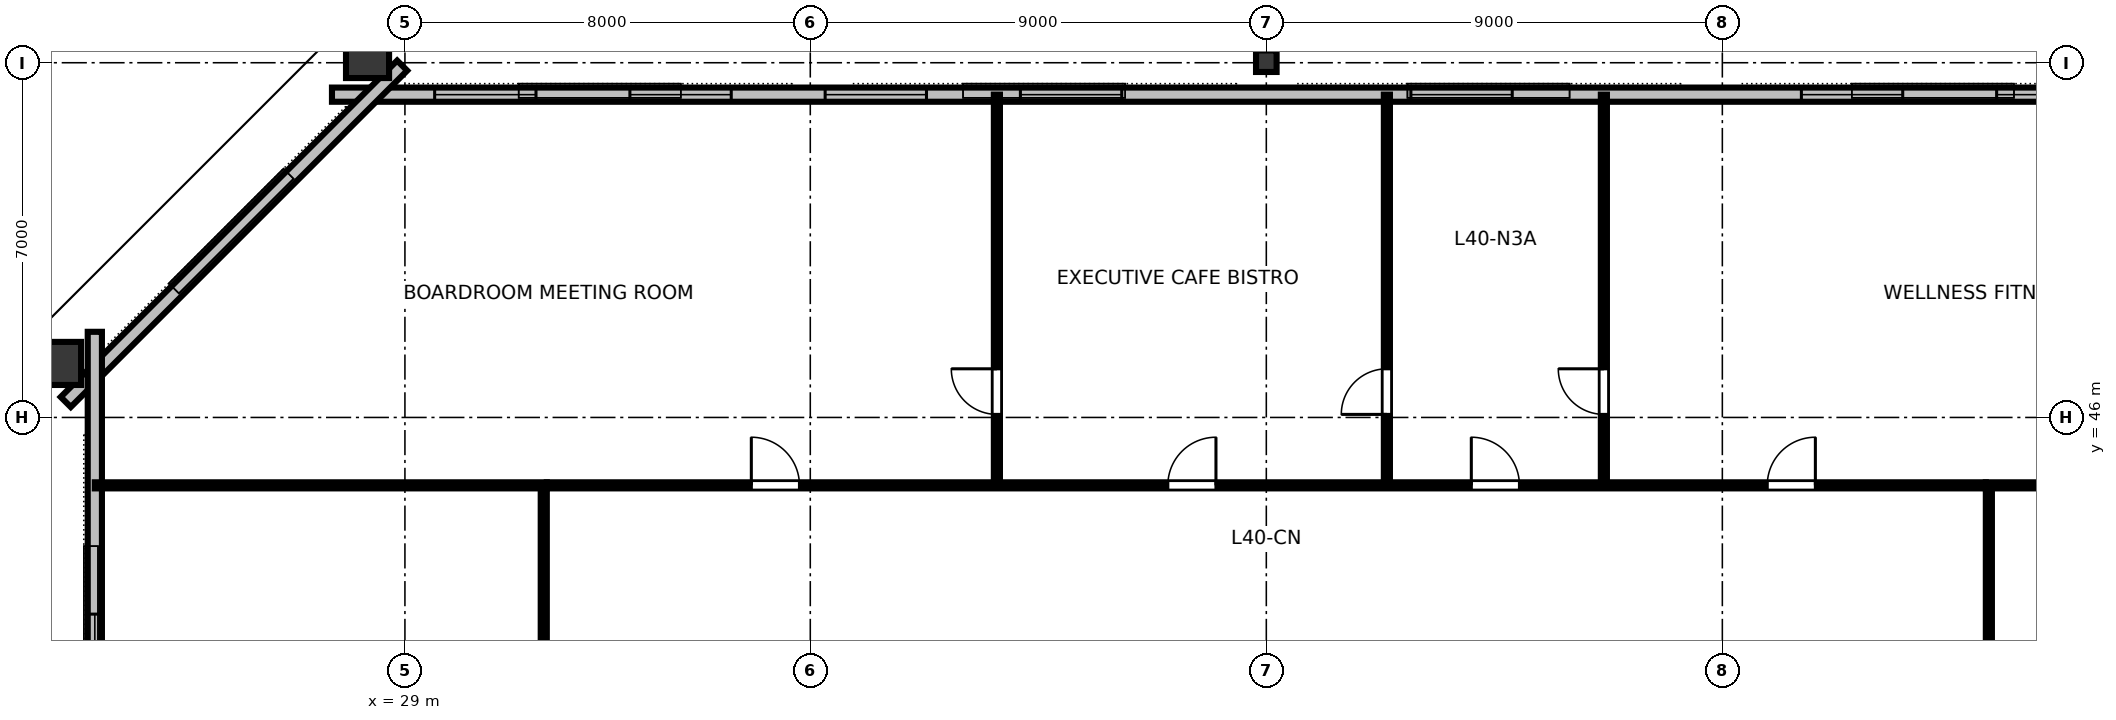
"""IFC4 building model, lengths in metres.
Left out: names, types, materials, properties, quantities, classifications, styles, units other than length and angle.
Written with IfcOpenShell. Run it as: python <this file> out.ifc"""

import sys

from ifc_helpers import new_model, si_unit, direction, frame, frame_2d, origin, origin_2d, place, context, subcontext, project, spatial, rectangle, hollow_rectangle, i_section, extrude, element, fill, save


model = new_model("IFC4")
c1 = context("Model", 3, precision=1e-05, world=origin(), true_north=direction((0.0, 1.0)))
c2 = subcontext(c1, "Body", "Model", "MODEL_VIEW")
j1 = project(units=[si_unit("LENGTHUNIT", "METRE"), si_unit("PLANEANGLEUNIT", "RADIAN")], contexts=[c1])
p1 = place(None, origin())
s1 = spatial("IfcSite", under=j1, at=p1, CompositionType="ELEMENT")
p2 = place(p1, origin())
s2 = spatial("IfcBuilding", under=s1, at=p2, CompositionType="ELEMENT")
p3 = place(p2, frame((0.0, 0.0, 152.8)))
s3 = spatial("IfcBuildingStorey", under=s2, at=p3, CompositionType="ELEMENT", Elevation=152.8)
p4 = place(p3, frame((46.0, 53.03, 0.0), z_axis=(0.0, 0.0, 1.0), x_axis=(1.0, 0.0, 0.0)))
e1 = element("IfcColumn", 1, at=p4, inside=s3, PredefinedType="COLUMN", context=c2, shape_type="SweptSolid", body=[
    extrude(i_section(OverallWidth=0.406, OverallDepth=0.425, WebThickness=0.033, FlangeThickness=0.052, FilletRadius=0.025, at=origin_2d()), origin(), (0.0, 0.0, 1.0), 3.358),
])
for number, where, z_axis, x_axis in (
    (2, (28.262, 53.198, 0.0), (0.0, 0.0, 1.0), (1.0, 0.0, 0.0)),
    (3, (22.109, 47.066, 0.0), (0.0, 0.0, 1.0), (0.0, 1.0, 0.0)),
):
    element("IfcColumn", number, at=place(p3, frame(where, z_axis=z_axis, x_axis=x_axis)), inside=s3, PredefinedType="COLUMN", context=c2, shape_type="SweptSolid", body=[
        extrude(hollow_rectangle(XDim=0.85, YDim=1.0, WallThickness=0.05, at=origin_2d()), origin(), (0.0, 0.0, 1.0), 3.358),
    ])
p5 = place(p3, frame((64.44, 52.37, 0.0), z_axis=(0.0, 0.0, 1.0), x_axis=(-1.0, 0.0, 0.0)))
e4 = element("IfcWall", 4, at=p5, inside=s3, PredefinedType="STANDARD", context=c2, shape_type="SweptSolid", body=[
    extrude(rectangle(XDim=36.88, YDim=0.28, at=frame_2d((18.44, 0.0))), origin(), (0.0, 0.0, 1.0), 3.36),
])
p6 = place(p5, frame((2.027, 0.0, 0.8)))
e5 = element("IfcOpeningElement", 5, at=p6, cuts=e4, PredefinedType="OPENING", context=c2, shape_type="SweptSolid", body=[
    extrude(rectangle(XDim=2.0, YDim=1.95, at=frame_2d((1.0, 0.975))), frame((0.0, 0.15, 0.0), z_axis=(0.0, -1.0, 0.0), x_axis=(1.0, 0.0, 0.0)), (0.0, 0.0, 1.0), 0.3),
])
p7 = place(p5, frame((5.88, 0.0, 0.8)))
e6 = element("IfcOpeningElement", 6, at=p7, cuts=e4, PredefinedType="OPENING", context=c2, shape_type="SweptSolid", body=[
    extrude(rectangle(XDim=2.0, YDim=1.95, at=frame_2d((1.0, 0.975))), frame((0.0, 0.15, 0.0), z_axis=(0.0, -1.0, 0.0), x_axis=(1.0, 0.0, 0.0)), (0.0, 0.0, 1.0), 0.3),
])
p8 = place(p5, frame((13.587, 0.0, 0.8)))
e7 = element("IfcOpeningElement", 7, at=p8, cuts=e4, PredefinedType="OPENING", context=c2, shape_type="SweptSolid", body=[
    extrude(rectangle(XDim=2.0, YDim=1.95, at=frame_2d((1.0, 0.975))), frame((0.0, 0.15, 0.0), z_axis=(0.0, -1.0, 0.0), x_axis=(1.0, 0.0, 0.0)), (0.0, 0.0, 1.0), 0.3),
])
p9 = place(p5, frame((21.293, 0.0, 0.8)))
e8 = element("IfcOpeningElement", 8, at=p9, cuts=e4, PredefinedType="OPENING", context=c2, shape_type="SweptSolid", body=[
    extrude(rectangle(XDim=2.0, YDim=1.95, at=frame_2d((1.0, 0.975))), frame((0.0, 0.15, 0.0), z_axis=(0.0, -1.0, 0.0), x_axis=(1.0, 0.0, 0.0)), (0.0, 0.0, 1.0), 0.3),
])
p10 = place(p5, frame((25.147, 0.0, 0.8)))
e9 = element("IfcOpeningElement", 9, at=p10, cuts=e4, PredefinedType="OPENING", context=c2, shape_type="SweptSolid", body=[
    extrude(rectangle(XDim=2.0, YDim=1.95, at=frame_2d((1.0, 0.975))), frame((0.0, 0.15, 0.0), z_axis=(0.0, -1.0, 0.0), x_axis=(1.0, 0.0, 0.0)), (0.0, 0.0, 1.0), 0.3),
])
p11 = place(p5, frame((29.0, 0.0, 0.8)))
e10 = element("IfcOpeningElement", 10, at=p11, cuts=e4, PredefinedType="OPENING", context=c2, shape_type="SweptSolid", body=[
    extrude(rectangle(XDim=2.0, YDim=1.95, at=frame_2d((1.0, 0.975))), frame((0.0, 0.15, 0.0), z_axis=(0.0, -1.0, 0.0), x_axis=(1.0, 0.0, 0.0)), (0.0, 0.0, 1.0), 0.3),
])
p12 = place(p5, frame((32.853, 0.0, 0.8)))
e11 = element("IfcOpeningElement", 11, at=p12, cuts=e4, PredefinedType="OPENING", context=c2, shape_type="SweptSolid", body=[
    extrude(rectangle(XDim=2.0, YDim=1.95, at=frame_2d((1.0, 0.975))), frame((0.0, 0.15, 0.0), z_axis=(0.0, -1.0, 0.0), x_axis=(1.0, 0.0, 0.0)), (0.0, 0.0, 1.0), 0.3),
])
p13 = place(p3, frame((28.946, 52.944, 0.0), z_axis=(0.0, 0.0, 1.0), x_axis=(-0.707106781187, -0.707106781187, 0.0)))
e12 = element("IfcWall", 12, at=p13, inside=s3, PredefinedType="STANDARD", context=c2, shape_type="SweptSolid", body=[
    extrude(rectangle(XDim=9.39, YDim=0.28, at=frame_2d((4.695, 0.0))), origin(), (0.0, 0.0, 1.0), 3.36),
])
p14 = place(p3, frame((22.88, 47.69, 0.0), z_axis=(0.0, 0.0, 1.0), x_axis=(0.0, -1.0, 0.0)))
e13 = element("IfcWall", 13, at=p14, inside=s3, PredefinedType="STANDARD", context=c2, shape_type="SweptSolid", body=[
    extrude(rectangle(XDim=31.38, YDim=0.28, at=frame_2d((15.69, 0.0))), origin(), (0.0, 0.0, 1.0), 3.36),
])
p15 = place(p14, frame((5.571, 0.0, 0.8)))
e14 = element("IfcOpeningElement", 14, at=p15, cuts=e13, PredefinedType="OPENING", context=c2, shape_type="SweptSolid", body=[
    extrude(rectangle(XDim=2.0, YDim=1.95, at=frame_2d((1.0, 0.975))), frame((0.0, 0.15, 0.0), z_axis=(0.0, -1.0, 0.0), x_axis=(1.0, 0.0, 0.0)), (0.0, 0.0, 1.0), 0.3),
])
p16 = place(p14, frame((20.161, 0.0, 0.8)))
e15 = element("IfcOpeningElement", 15, at=p16, cuts=e13, PredefinedType="OPENING", context=c2, shape_type="SweptSolid", body=[
    extrude(rectangle(XDim=2.0, YDim=1.95, at=frame_2d((1.0, 0.975))), frame((0.0, 0.15, 0.0), z_axis=(0.0, -1.0, 0.0), x_axis=(1.0, 0.0, 0.0)), (0.0, 0.0, 1.0), 0.3),
])
p17 = place(p14, frame((23.809, 0.0, 0.8)))
e16 = element("IfcOpeningElement", 16, at=p17, cuts=e13, PredefinedType="OPENING", context=c2, shape_type="SweptSolid", body=[
    extrude(rectangle(XDim=2.0, YDim=1.95, at=frame_2d((1.0, 0.975))), frame((0.0, 0.15, 0.0), z_axis=(0.0, -1.0, 0.0), x_axis=(1.0, 0.0, 0.0)), (0.0, 0.0, 1.0), 0.3),
])
p18 = place(p3, frame((40.683, 44.66, 0.0), z_axis=(0.0, 0.0, 1.0), x_axis=(0.0, 1.0, 0.0)))
e17 = element("IfcWall", 17, at=p18, inside=s3, PredefinedType="PARTITIONING", context=c2, shape_type="SweptSolid", body=[
    extrude(rectangle(XDim=7.71, YDim=0.12, at=frame_2d((3.855, 0.0))), origin(), (0.0, 0.0, 1.0), 2.64),
])
p19 = place(p18, frame((1.4, 0.0, 0.0)))
e18 = element("IfcOpeningElement", 18, at=p19, cuts=e17, PredefinedType="OPENING", context=c2, shape_type="SweptSolid", body=[
    extrude(rectangle(XDim=0.9, YDim=2.15, at=frame_2d((0.45, 1.075))), frame((0.0, 0.07, 0.0), z_axis=(0.0, -1.0, 0.0), x_axis=(1.0, 0.0, 0.0)), (0.0, 0.0, 1.0), 0.14),
])
p20 = place(p3, frame((48.38, 44.66, 0.0), z_axis=(0.0, 0.0, 1.0), x_axis=(0.0, 1.0, 0.0)))
e19 = element("IfcWall", 19, at=p20, inside=s3, PredefinedType="PARTITIONING", context=c2, shape_type="SweptSolid", body=[
    extrude(rectangle(XDim=7.71, YDim=0.12, at=frame_2d((3.855, 0.0))), origin(), (0.0, 0.0, 1.0), 2.64),
])
p21 = place(p20, frame((1.4, 0.0, 0.0)))
e20 = element("IfcOpeningElement", 20, at=p21, cuts=e19, PredefinedType="OPENING", context=c2, shape_type="SweptSolid", body=[
    extrude(rectangle(XDim=0.9, YDim=2.15, at=frame_2d((0.45, 1.075))), frame((0.0, 0.07, 0.0), z_axis=(0.0, -1.0, 0.0), x_axis=(1.0, 0.0, 0.0)), (0.0, 0.0, 1.0), 0.14),
])
p22 = place(p3, frame((52.662, 44.66, 0.0), z_axis=(0.0, 0.0, 1.0), x_axis=(0.0, 1.0, 0.0)))
e21 = element("IfcWall", 21, at=p22, inside=s3, PredefinedType="PARTITIONING", context=c2, shape_type="SweptSolid", body=[
    extrude(rectangle(XDim=7.71, YDim=0.12, at=frame_2d((3.855, 0.0))), origin(), (0.0, 0.0, 1.0), 2.64),
])
p23 = place(p22, frame((1.4, 0.0, 0.0)))
e22 = element("IfcOpeningElement", 22, at=p23, cuts=e21, PredefinedType="OPENING", context=c2, shape_type="SweptSolid", body=[
    extrude(rectangle(XDim=0.9, YDim=2.15, at=frame_2d((0.45, 1.075))), frame((0.0, 0.07, 0.0), z_axis=(0.0, -1.0, 0.0), x_axis=(1.0, 0.0, 0.0)), (0.0, 0.0, 1.0), 0.14),
])
p24 = place(p3, frame((31.8, 44.66, 0.0), z_axis=(0.0, 0.0, 1.0), x_axis=(1.0, 0.0, 0.0)))
e23 = element("IfcWall", 23, at=p24, inside=s3, PredefinedType="PARTITIONING", context=c2, shape_type="SweptSolid", body=[
    extrude(rectangle(XDim=28.4, YDim=0.12, at=frame_2d((14.2, 0.0))), origin(), (0.0, 0.0, 1.0), 2.64),
])
p25 = place(p24, frame((4.036, 0.0, 0.0)))
e24 = element("IfcOpeningElement", 24, at=p25, cuts=e23, PredefinedType="OPENING", context=c2, shape_type="SweptSolid", body=[
    extrude(rectangle(XDim=0.95, YDim=2.15, at=frame_2d((0.475, 1.075))), frame((0.0, 0.07, 0.0), z_axis=(0.0, -1.0, 0.0), x_axis=(1.0, 0.0, 0.0)), (0.0, 0.0, 1.0), 0.14),
])
p26 = place(p24, frame((12.256, 0.0, 0.0)))
e25 = element("IfcOpeningElement", 25, at=p26, cuts=e23, PredefinedType="OPENING", context=c2, shape_type="SweptSolid", body=[
    extrude(rectangle(XDim=0.95, YDim=2.15, at=frame_2d((0.475, 1.075))), frame((0.0, 0.07, 0.0), z_axis=(0.0, -1.0, 0.0), x_axis=(1.0, 0.0, 0.0)), (0.0, 0.0, 1.0), 0.14),
])
p27 = place(p24, frame((18.246, 0.0, 0.0)))
e26 = element("IfcOpeningElement", 26, at=p27, cuts=e23, PredefinedType="OPENING", context=c2, shape_type="SweptSolid", body=[
    extrude(rectangle(XDim=0.95, YDim=2.15, at=frame_2d((0.475, 1.075))), frame((0.0, 0.07, 0.0), z_axis=(0.0, -1.0, 0.0), x_axis=(1.0, 0.0, 0.0)), (0.0, 0.0, 1.0), 0.14),
])
p28 = place(p24, frame((24.086, 0.0, 0.0)))
e27 = element("IfcOpeningElement", 27, at=p28, cuts=e23, PredefinedType="OPENING", context=c2, shape_type="SweptSolid", body=[
    extrude(rectangle(XDim=0.95, YDim=2.15, at=frame_2d((0.475, 1.075))), frame((0.0, 0.07, 0.0), z_axis=(0.0, -1.0, 0.0), x_axis=(1.0, 0.0, 0.0)), (0.0, 0.0, 1.0), 0.14),
])
p29 = place(p3, frame((31.74, 33.02, 0.0), z_axis=(0.0, 0.0, 1.0), x_axis=(0.0, 1.0, 0.0)))
e28 = element("IfcWall", 28, at=p29, inside=s3, PredefinedType="PARTITIONING", context=c2, shape_type="SweptSolid", body=[
    extrude(rectangle(XDim=11.58, YDim=0.12, at=frame_2d((5.79, 0.0))), origin(), (0.0, 0.0, 1.0), 2.64),
])
p30 = place(p29, frame((1.44, 0.0, 0.0)))
e29 = element("IfcOpeningElement", 29, at=p30, cuts=e28, PredefinedType="OPENING", context=c2, shape_type="SweptSolid", body=[
    extrude(rectangle(XDim=0.95, YDim=2.15, at=frame_2d((0.475, 1.075))), frame((0.0, 0.07, 0.0), z_axis=(0.0, -1.0, 0.0), x_axis=(1.0, 0.0, 0.0)), (0.0, 0.0, 1.0), 0.14),
])
p31 = place(p29, frame((7.13, 0.0, 0.0)))
e30 = element("IfcOpeningElement", 30, at=p31, cuts=e28, PredefinedType="OPENING", context=c2, shape_type="SweptSolid", body=[
    extrude(rectangle(XDim=0.95, YDim=2.15, at=frame_2d((0.475, 1.075))), frame((0.0, 0.07, 0.0), z_axis=(0.0, -1.0, 0.0), x_axis=(1.0, 0.0, 0.0)), (0.0, 0.0, 1.0), 0.14),
])
p32 = place(p3, frame((60.26, 33.02, 0.0), z_axis=(0.0, 0.0, 1.0), x_axis=(0.0, 1.0, 0.0)))
e31 = element("IfcWall", 31, at=p32, inside=s3, PredefinedType="PARTITIONING", context=c2, shape_type="SweptSolid", body=[
    extrude(rectangle(XDim=11.58, YDim=0.12, at=frame_2d((5.79, 0.0))), origin(), (0.0, 0.0, 1.0), 2.64),
])
p33 = place(p32, frame((5.215, 0.0, 0.0)))
e32 = element("IfcOpeningElement", 32, at=p33, cuts=e31, PredefinedType="OPENING", context=c2, shape_type="SweptSolid", body=[
    extrude(rectangle(XDim=0.95, YDim=2.15, at=frame_2d((0.475, 1.075))), frame((0.0, 0.07, 0.0), z_axis=(0.0, -1.0, 0.0), x_axis=(1.0, 0.0, 0.0)), (0.0, 0.0, 1.0), 0.14),
])
for number, where, z_axis, x_axis in (
    (33, (31.8, 44.66, 0.0), (0.0, 0.0, 1.0), (-1.0, 0.0, 0.0)),
    (34, (60.2, 44.66, 0.0), (0.0, 0.0, 1.0), (1.0, 0.0, 0.0)),
):
    element("IfcWall", number, at=place(p3, frame(where, z_axis=z_axis, x_axis=x_axis)), inside=s3, PredefinedType="PARTITIONING", context=c2, shape_type="SweptSolid", body=[
        extrude(rectangle(XDim=8.92, YDim=0.12, at=frame_2d((4.46, 0.0))), origin(), (0.0, 0.0, 1.0), 2.64),
    ])
p34 = place(p6, origin())
e35 = element("IfcWindow", 35, at=p34, inside=s3, PartitioningType="SINGLE_PANEL", PredefinedType="WINDOW", context=c2, shape_type="SweptSolid", body=[
    extrude(rectangle(XDim=2.0, YDim=1.95, at=frame_2d((1.0, 0.975))), frame((0.0, 0.03, 0.0), z_axis=(0.0, -1.0, 0.0), x_axis=(1.0, 0.0, 0.0)), (0.0, 0.0, 1.0), 0.06),
])
fill(e5, e35)
p35 = place(p7, origin())
e36 = element("IfcWindow", 36, at=p35, inside=s3, PartitioningType="SINGLE_PANEL", PredefinedType="WINDOW", context=c2, shape_type="SweptSolid", body=[
    extrude(rectangle(XDim=2.0, YDim=1.95, at=frame_2d((1.0, 0.975))), frame((0.0, 0.03, 0.0), z_axis=(0.0, -1.0, 0.0), x_axis=(1.0, 0.0, 0.0)), (0.0, 0.0, 1.0), 0.06),
])
fill(e6, e36)
p36 = place(p8, origin())
e37 = element("IfcWindow", 37, at=p36, inside=s3, PartitioningType="SINGLE_PANEL", PredefinedType="WINDOW", context=c2, shape_type="SweptSolid", body=[
    extrude(rectangle(XDim=2.0, YDim=1.95, at=frame_2d((1.0, 0.975))), frame((0.0, 0.03, 0.0), z_axis=(0.0, -1.0, 0.0), x_axis=(1.0, 0.0, 0.0)), (0.0, 0.0, 1.0), 0.06),
])
fill(e7, e37)
p37 = place(p9, origin())
e38 = element("IfcWindow", 38, at=p37, inside=s3, PartitioningType="SINGLE_PANEL", PredefinedType="WINDOW", context=c2, shape_type="SweptSolid", body=[
    extrude(rectangle(XDim=2.0, YDim=1.95, at=frame_2d((1.0, 0.975))), frame((0.0, 0.03, 0.0), z_axis=(0.0, -1.0, 0.0), x_axis=(1.0, 0.0, 0.0)), (0.0, 0.0, 1.0), 0.06),
])
fill(e8, e38)
p38 = place(p10, origin())
e39 = element("IfcWindow", 39, at=p38, inside=s3, PartitioningType="SINGLE_PANEL", PredefinedType="WINDOW", context=c2, shape_type="SweptSolid", body=[
    extrude(rectangle(XDim=2.0, YDim=1.95, at=frame_2d((1.0, 0.975))), frame((0.0, 0.03, 0.0), z_axis=(0.0, -1.0, 0.0), x_axis=(1.0, 0.0, 0.0)), (0.0, 0.0, 1.0), 0.06),
])
fill(e9, e39)
p39 = place(p11, origin())
e40 = element("IfcWindow", 40, at=p39, inside=s3, PartitioningType="SINGLE_PANEL", PredefinedType="WINDOW", context=c2, shape_type="SweptSolid", body=[
    extrude(rectangle(XDim=2.0, YDim=1.95, at=frame_2d((1.0, 0.975))), frame((0.0, 0.03, 0.0), z_axis=(0.0, -1.0, 0.0), x_axis=(1.0, 0.0, 0.0)), (0.0, 0.0, 1.0), 0.06),
])
fill(e10, e40)
p40 = place(p12, origin())
e41 = element("IfcWindow", 41, at=p40, inside=s3, PartitioningType="SINGLE_PANEL", PredefinedType="WINDOW", context=c2, shape_type="SweptSolid", body=[
    extrude(rectangle(XDim=2.0, YDim=1.95, at=frame_2d((1.0, 0.975))), frame((0.0, 0.03, 0.0), z_axis=(0.0, -1.0, 0.0), x_axis=(1.0, 0.0, 0.0)), (0.0, 0.0, 1.0), 0.06),
])
fill(e11, e41)
p41 = place(p15, origin())
e42 = element("IfcWindow", 42, at=p41, inside=s3, PartitioningType="SINGLE_PANEL", PredefinedType="WINDOW", context=c2, shape_type="SweptSolid", body=[
    extrude(rectangle(XDim=2.0, YDim=1.95, at=frame_2d((1.0, 0.975))), frame((0.0, 0.03, 0.0), z_axis=(0.0, -1.0, 0.0), x_axis=(1.0, 0.0, 0.0)), (0.0, 0.0, 1.0), 0.06),
])
fill(e14, e42)
p42 = place(p19, origin())
e43 = element("IfcDoor", 43, at=p42, inside=s3, OperationType="SINGLE_SWING_RIGHT", PredefinedType="DOOR", context=c2, shape_type="SweptSolid", body=[
    extrude(rectangle(XDim=0.9, YDim=2.15, at=frame_2d((0.45, 1.075))), frame((0.0, 0.025, 0.0), z_axis=(0.0, -1.0, 0.0), x_axis=(1.0, 0.0, 0.0)), (0.0, 0.0, 1.0), 0.05),
])
fill(e18, e43)
p43 = place(p21, origin())
e44 = element("IfcDoor", 44, at=p43, inside=s3, OperationType="SINGLE_SWING_LEFT", PredefinedType="DOOR", context=c2, shape_type="SweptSolid", body=[
    extrude(rectangle(XDim=0.9, YDim=2.15, at=frame_2d((0.45, 1.075))), frame((0.0, 0.025, 0.0), z_axis=(0.0, -1.0, 0.0), x_axis=(1.0, 0.0, 0.0)), (0.0, 0.0, 1.0), 0.05),
])
fill(e20, e44)
p44 = place(p23, origin())
e45 = element("IfcDoor", 45, at=p44, inside=s3, OperationType="SINGLE_SWING_RIGHT", PredefinedType="DOOR", context=c2, shape_type="SweptSolid", body=[
    extrude(rectangle(XDim=0.9, YDim=2.15, at=frame_2d((0.45, 1.075))), frame((0.0, 0.025, 0.0), z_axis=(0.0, -1.0, 0.0), x_axis=(1.0, 0.0, 0.0)), (0.0, 0.0, 1.0), 0.05),
])
fill(e22, e45)
p45 = place(p25, origin())
e46 = element("IfcDoor", 46, at=p45, inside=s3, OperationType="SINGLE_SWING_LEFT", PredefinedType="DOOR", context=c2, shape_type="SweptSolid", body=[
    extrude(rectangle(XDim=0.95, YDim=2.15, at=frame_2d((0.475, 1.075))), frame((0.0, 0.025, 0.0), z_axis=(0.0, -1.0, 0.0), x_axis=(1.0, 0.0, 0.0)), (0.0, 0.0, 1.0), 0.05),
])
fill(e24, e46)
p46 = place(p26, origin())
e47 = element("IfcDoor", 47, at=p46, inside=s3, OperationType="SINGLE_SWING_RIGHT", PredefinedType="DOOR", context=c2, shape_type="SweptSolid", body=[
    extrude(rectangle(XDim=0.95, YDim=2.15, at=frame_2d((0.475, 1.075))), frame((0.0, 0.025, 0.0), z_axis=(0.0, -1.0, 0.0), x_axis=(1.0, 0.0, 0.0)), (0.0, 0.0, 1.0), 0.05),
])
fill(e25, e47)
p47 = place(p27, origin())
e48 = element("IfcDoor", 48, at=p47, inside=s3, OperationType="SINGLE_SWING_LEFT", PredefinedType="DOOR", context=c2, shape_type="SweptSolid", body=[
    extrude(rectangle(XDim=0.95, YDim=2.15, at=frame_2d((0.475, 1.075))), frame((0.0, 0.025, 0.0), z_axis=(0.0, -1.0, 0.0), x_axis=(1.0, 0.0, 0.0)), (0.0, 0.0, 1.0), 0.05),
])
fill(e26, e48)
p48 = place(p28, origin())
e49 = element("IfcDoor", 49, at=p48, inside=s3, OperationType="SINGLE_SWING_RIGHT", PredefinedType="DOOR", context=c2, shape_type="SweptSolid", body=[
    extrude(rectangle(XDim=0.95, YDim=2.15, at=frame_2d((0.475, 1.075))), frame((0.0, 0.025, 0.0), z_axis=(0.0, -1.0, 0.0), x_axis=(1.0, 0.0, 0.0)), (0.0, 0.0, 1.0), 0.05),
])
fill(e27, e49)
save(model, sys.argv[1])
